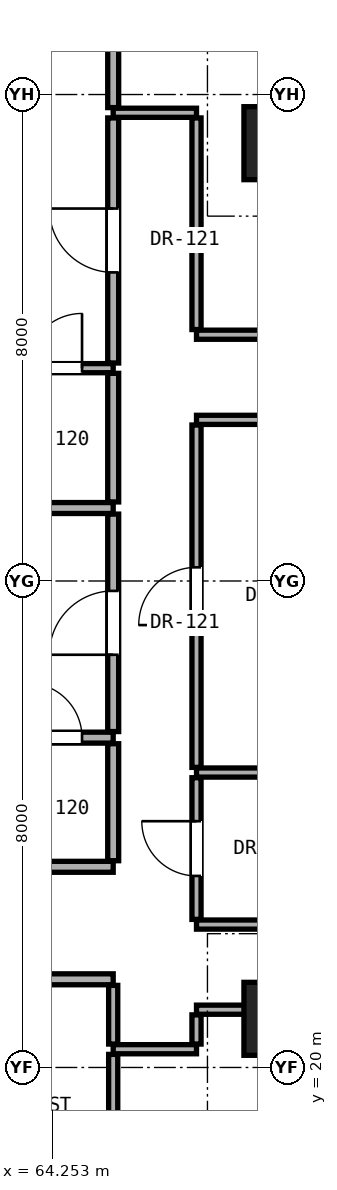
"""IFC4 building model, lengths in metres.
Left out: names, types, materials, properties, quantities, classifications, styles, units other than length and angle.
Written with IfcOpenShell. Run it as: python <this file> out.ifc"""

import sys

from ifc_helpers import new_model, si_unit, direction, frame, frame_2d, origin, origin_2d, place, context, subcontext, project, spatial, rectangle, extrude, element, fill, save


model = new_model("IFC4")
c1 = context("Model", 3, precision=1e-05, world=origin(), true_north=direction((0.0, 1.0)))
c2 = subcontext(c1, "Body", "Model", "MODEL_VIEW")
j1 = project(units=[si_unit("LENGTHUNIT", "METRE"), si_unit("PLANEANGLEUNIT", "RADIAN")], contexts=[c1])
p1 = place(None, origin())
s1 = spatial("IfcSite", under=j1, at=p1, CompositionType="ELEMENT")
p2 = place(p1, origin())
s2 = spatial("IfcBuilding", under=s1, at=p2, CompositionType="ELEMENT")
p3 = place(p2, frame((0.0, 0.0, 88.4)))
s3 = spatial("IfcBuildingStorey", under=s2, at=p3, CompositionType="ELEMENT", Elevation=88.4)
for number, where, z_axis, x_axis in (
    (1, (68.0, 20.8, 0.0), (0.0, 0.0, 1.0), (1.0, 0.0, 0.0)),
    (2, (68.0, 35.2, 0.0), (0.0, 0.0, 1.0), (1.0, 0.0, 0.0)),
):
    element("IfcColumn", number, at=place(p3, frame(where, z_axis=z_axis, x_axis=x_axis)), inside=s3, PredefinedType="COLUMN", context=c2, shape_type="SweptSolid", body=[
        extrude(rectangle(XDim=1.2, YDim=1.2, at=origin_2d()), origin(), (0.0, 0.0, 1.0), 3.3),
    ])
p4 = place(p3, frame((65.25, 20.3, 0.0), z_axis=(0.0, 0.0, 1.0), x_axis=(1.0, 0.0, 0.0)))
e3 = element("IfcWall", 3, at=p4, inside=s3, PredefinedType="PARTITIONING", context=c2, shape_type="SweptSolid", body=[
    extrude(rectangle(XDim=1.37, YDim=0.15, at=frame_2d((0.685, 0.0))), origin(), (0.0, 0.0, 1.0), 3.08),
])
p5 = place(p3, frame((66.62, 20.95, 0.0), z_axis=(0.0, 0.0, 1.0), x_axis=(1.0, 0.0, 0.0)))
e4 = element("IfcWall", 4, at=p5, inside=s3, PredefinedType="PARTITIONING", context=c2, shape_type="SweptSolid", body=[
    extrude(rectangle(XDim=1.06, YDim=0.15, at=frame_2d((0.53, 0.0))), origin(), (0.0, 0.0, 1.0), 2.472),
])
p6 = place(p3, frame((58.738, 21.45, 0.0), z_axis=(0.0, 0.0, 1.0), x_axis=(1.0, 0.0, 0.0)))
e5 = element("IfcWall", 5, at=p6, inside=s3, PredefinedType="PARTITIONING", context=c2, shape_type="SweptSolid", body=[
    extrude(rectangle(XDim=6.512, YDim=0.18, at=frame_2d((3.256, 0.0))), origin(), (0.0, 0.0, 1.0), 2.085),
])
p7 = place(p6, frame((4.117, 0.0, 0.0)))
e6 = element("IfcOpeningElement", 6, at=p7, cuts=e5, PredefinedType="OPENING", context=c2, shape_type="SweptSolid", body=[
    extrude(rectangle(XDim=0.85, YDim=2.01, at=frame_2d((0.425, 1.005))), frame((0.0, 0.1, 0.0), z_axis=(0.0, -1.0, 0.0), x_axis=(1.0, 0.0, 0.0)), (0.0, 0.0, 1.0), 0.2),
])
p8 = place(p3, frame((66.62, 22.35, 0.0), z_axis=(0.0, 0.0, 1.0), x_axis=(1.0, 0.0, 0.0)))
e7 = element("IfcWall", 7, at=p8, inside=s3, PredefinedType="PARTITIONING", context=c2, shape_type="SweptSolid", body=[
    extrude(rectangle(XDim=19.63, YDim=0.15, at=frame_2d((9.815, 0.0))), origin(), (0.0, 0.0, 1.0), 2.145),
])
p9 = place(p8, frame((12.085, 0.0, 0.0)))
e8 = element("IfcOpeningElement", 8, at=p9, cuts=e7, PredefinedType="OPENING", context=c2, shape_type="SweptSolid", body=[
    extrude(rectangle(XDim=0.85, YDim=2.01, at=frame_2d((0.425, 1.005))), frame((0.0, 0.085, 0.0), z_axis=(0.0, -1.0, 0.0), x_axis=(1.0, 0.0, 0.0)), (0.0, 0.0, 1.0), 0.17),
])
p10 = place(p3, frame((32.14, 23.3, 0.0), z_axis=(0.0, 0.0, 1.0), x_axis=(1.0, 0.0, 0.0)))
e9 = element("IfcWall", 9, at=p10, inside=s3, PredefinedType="PARTITIONING", context=c2, shape_type="SweptSolid", body=[
    extrude(rectangle(XDim=33.11, YDim=0.18, at=frame_2d((16.555, 0.0))), origin(), (0.0, 0.0, 1.0), 2.145),
])
p11 = place(p10, frame((12.335, 0.0, 0.0)))
e10 = element("IfcOpeningElement", 10, at=p11, cuts=e9, PredefinedType="OPENING", context=c2, shape_type="SweptSolid", body=[
    extrude(rectangle(XDim=0.85, YDim=2.01, at=frame_2d((0.425, 1.005))), frame((0.0, 0.1, 0.0), z_axis=(0.0, -1.0, 0.0), x_axis=(1.0, 0.0, 0.0)), (0.0, 0.0, 1.0), 0.2),
])
p12 = place(p10, frame((19.504, 0.0, 0.0)))
e11 = element("IfcOpeningElement", 11, at=p12, cuts=e9, PredefinedType="OPENING", context=c2, shape_type="SweptSolid", body=[
    extrude(rectangle(XDim=0.85, YDim=2.01, at=frame_2d((0.425, 1.005))), frame((0.0, 0.1, 0.0), z_axis=(0.0, -1.0, 0.0), x_axis=(1.0, 0.0, 0.0)), (0.0, 0.0, 1.0), 0.2),
])
p13 = place(p10, frame((24.398, 0.0, 0.0)))
e12 = element("IfcOpeningElement", 12, at=p13, cuts=e9, PredefinedType="OPENING", context=c2, shape_type="SweptSolid", body=[
    extrude(rectangle(XDim=0.9, YDim=2.1, at=frame_2d((0.45, 1.05))), frame((0.0, 0.1, 0.0), z_axis=(0.0, -1.0, 0.0), x_axis=(1.0, 0.0, 0.0)), (0.0, 0.0, 1.0), 0.2),
])
p14 = place(p3, frame((66.62, 24.85, 0.0), z_axis=(0.0, 0.0, 1.0), x_axis=(1.0, 0.0, 0.0)))
e13 = element("IfcWall", 13, at=p14, inside=s3, PredefinedType="PARTITIONING", context=c2, shape_type="SweptSolid", body=[
    extrude(rectangle(XDim=3.13, YDim=0.15, at=frame_2d((1.565, 0.0))), origin(), (0.0, 0.0, 1.0), 2.145),
])
p15 = place(p3, frame((59.358, 25.424, 0.0), z_axis=(0.0, 0.0, 1.0), x_axis=(1.0, 0.0, 0.0)))
e14 = element("IfcWall", 14, at=p15, inside=s3, PredefinedType="PARTITIONING", context=c2, shape_type="SweptSolid", body=[
    extrude(rectangle(XDim=5.892, YDim=0.18, at=frame_2d((2.946, 0.0))), origin(), (0.0, 0.0, 1.0), 2.216),
])
p16 = place(p15, frame((1.549, 0.0, 0.0)))
e15 = element("IfcOpeningElement", 15, at=p16, cuts=e14, PredefinedType="OPENING", context=c2, shape_type="SweptSolid", body=[
    extrude(rectangle(XDim=0.95, YDim=2.15, at=frame_2d((0.475, 1.075))), frame((0.0, 0.1, 0.0), z_axis=(0.0, -1.0, 0.0), x_axis=(1.0, 0.0, 0.0)), (0.0, 0.0, 1.0), 0.2),
])
p17 = place(p15, frame((4.479, 0.0, 0.0)))
e16 = element("IfcOpeningElement", 16, at=p17, cuts=e14, PredefinedType="OPENING", context=c2, shape_type="SweptSolid", body=[
    extrude(rectangle(XDim=0.9, YDim=2.1, at=frame_2d((0.45, 1.05))), frame((0.0, 0.1, 0.0), z_axis=(0.0, -1.0, 0.0), x_axis=(1.0, 0.0, 0.0)), (0.0, 0.0, 1.0), 0.2),
])
p18 = place(p3, frame((59.358, 29.2, 0.0), z_axis=(0.0, 0.0, 1.0), x_axis=(1.0, 0.0, 0.0)))
e17 = element("IfcWall", 17, at=p18, inside=s3, PredefinedType="PARTITIONING", context=c2, shape_type="SweptSolid", body=[
    extrude(rectangle(XDim=5.892, YDim=0.18, at=frame_2d((2.946, 0.0))), origin(), (0.0, 0.0, 1.0), 2.216),
])
p19 = place(p3, frame((66.62, 30.65, 0.0), z_axis=(0.0, 0.0, 1.0), x_axis=(1.0, 0.0, 0.0)))
e18 = element("IfcWall", 18, at=p19, inside=s3, PredefinedType="PARTITIONING", context=c2, shape_type="SweptSolid", body=[
    extrude(rectangle(XDim=19.63, YDim=0.15, at=frame_2d((9.815, 0.0))), origin(), (0.0, 0.0, 1.0), 2.145),
])
p20 = place(p19, frame((3.855, 0.0, 0.0)))
e19 = element("IfcOpeningElement", 19, at=p20, cuts=e18, PredefinedType="OPENING", context=c2, shape_type="SweptSolid", body=[
    extrude(rectangle(XDim=0.85, YDim=2.01, at=frame_2d((0.425, 1.005))), frame((0.0, 0.085, 0.0), z_axis=(0.0, -1.0, 0.0), x_axis=(1.0, 0.0, 0.0)), (0.0, 0.0, 1.0), 0.17),
])
p21 = place(p19, frame((12.085, 0.0, 0.0)))
e20 = element("IfcOpeningElement", 20, at=p21, cuts=e18, PredefinedType="OPENING", context=c2, shape_type="SweptSolid", body=[
    extrude(rectangle(XDim=0.85, YDim=2.01, at=frame_2d((0.425, 1.005))), frame((0.0, 0.085, 0.0), z_axis=(0.0, -1.0, 0.0), x_axis=(1.0, 0.0, 0.0)), (0.0, 0.0, 1.0), 0.17),
])
p22 = place(p3, frame((59.358, 31.5, 0.0), z_axis=(0.0, 0.0, 1.0), x_axis=(1.0, 0.0, 0.0)))
e21 = element("IfcWall", 21, at=p22, inside=s3, PredefinedType="PARTITIONING", context=c2, shape_type="SweptSolid", body=[
    extrude(rectangle(XDim=5.892, YDim=0.15, at=frame_2d((2.946, 0.0))), origin(), (0.0, 0.0, 1.0), 2.216),
])
p23 = place(p22, frame((1.549, 0.0, 0.0)))
e22 = element("IfcOpeningElement", 22, at=p23, cuts=e21, PredefinedType="OPENING", context=c2, shape_type="SweptSolid", body=[
    extrude(rectangle(XDim=0.95, YDim=2.15, at=frame_2d((0.475, 1.075))), frame((0.0, 0.085, 0.0), z_axis=(0.0, -1.0, 0.0), x_axis=(1.0, 0.0, 0.0)), (0.0, 0.0, 1.0), 0.17),
])
p24 = place(p22, frame((4.479, 0.0, 0.0)))
e23 = element("IfcOpeningElement", 23, at=p24, cuts=e21, PredefinedType="OPENING", context=c2, shape_type="SweptSolid", body=[
    extrude(rectangle(XDim=0.9, YDim=2.1, at=frame_2d((0.45, 1.05))), frame((0.0, 0.085, 0.0), z_axis=(0.0, -1.0, 0.0), x_axis=(1.0, 0.0, 0.0)), (0.0, 0.0, 1.0), 0.17),
])
p25 = place(p3, frame((66.62, 32.05, 0.0), z_axis=(0.0, 0.0, 1.0), x_axis=(1.0, 0.0, 0.0)))
e24 = element("IfcWall", 24, at=p25, inside=s3, PredefinedType="PARTITIONING", context=c2, shape_type="SweptSolid", body=[
    extrude(rectangle(XDim=2.18, YDim=0.15, at=frame_2d((1.09, 0.0))), origin(), (0.0, 0.0, 1.0), 2.145),
])
p26 = place(p3, frame((65.25, 35.7, 0.0), z_axis=(0.0, 0.0, 1.0), x_axis=(1.0, 0.0, 0.0)))
e25 = element("IfcWall", 25, at=p26, inside=s3, PredefinedType="PARTITIONING", context=c2, shape_type="SweptSolid", body=[
    extrude(rectangle(XDim=1.37, YDim=0.15, at=frame_2d((0.685, 0.0))), origin(), (0.0, 0.0, 1.0), 3.08),
])
p27 = place(p3, frame((65.25, 17.004, 0.0), z_axis=(0.0, 0.0, 1.0), x_axis=(0.0, 1.0, 0.0)))
e26 = element("IfcWall", 26, at=p27, inside=s3, PredefinedType="PARTITIONING", context=c2, shape_type="SweptSolid", body=[
    extrude(rectangle(XDim=3.211, YDim=0.15, at=frame_2d((1.605, 0.0))), origin(), (0.0, 0.0, 1.0), 2.456),
])
p28 = place(p3, frame((65.25, 20.385, 0.0), z_axis=(0.0, 0.0, 1.0), x_axis=(0.0, 1.0, 0.0)))
e27 = element("IfcWall", 27, at=p28, inside=s3, PredefinedType="PARTITIONING", context=c2, shape_type="SweptSolid", body=[
    extrude(rectangle(XDim=0.965, YDim=0.15, at=frame_2d((0.482, 0.0))), origin(), (0.0, 0.0, 1.0), 2.472),
])
p29 = place(p3, frame((65.25, 23.4, 0.0), z_axis=(0.0, 0.0, 1.0), x_axis=(0.0, 1.0, 0.0)))
e28 = element("IfcWall", 28, at=p29, inside=s3, PredefinedType="PARTITIONING", context=c2, shape_type="SweptSolid", body=[
    extrude(rectangle(XDim=1.924, YDim=0.18, at=frame_2d((0.962, 0.0))), origin(), (0.0, 0.0, 1.0), 3.08),
])
p30 = place(p3, frame((65.25, 25.524, 0.0), z_axis=(0.0, 0.0, 1.0), x_axis=(0.0, 1.0, 0.0)))
e29 = element("IfcWall", 29, at=p30, inside=s3, PredefinedType="PARTITIONING", context=c2, shape_type="SweptSolid", body=[
    extrude(rectangle(XDim=3.576, YDim=0.18, at=frame_2d((1.788, 0.0))), origin(), (0.0, 0.0, 1.0), 2.299),
])
p31 = place(p30, frame((1.263, 0.0, 0.0)))
e30 = element("IfcOpeningElement", 30, at=p31, cuts=e29, PredefinedType="OPENING", context=c2, shape_type="SweptSolid", body=[
    extrude(rectangle(XDim=1.05, YDim=2.2, at=frame_2d((0.525, 1.1))), frame((0.0, 0.1, 0.0), z_axis=(0.0, -1.0, 0.0), x_axis=(1.0, 0.0, 0.0)), (0.0, 0.0, 1.0), 0.2),
])
p32 = place(p3, frame((65.25, 29.3, 0.0), z_axis=(0.0, 0.0, 1.0), x_axis=(0.0, 1.0, 0.0)))
e31 = element("IfcWall", 31, at=p32, inside=s3, PredefinedType="PARTITIONING", context=c2, shape_type="SweptSolid", body=[
    extrude(rectangle(XDim=2.115, YDim=0.18, at=frame_2d((1.058, 0.0))), origin(), (0.0, 0.0, 1.0), 3.08),
])
p33 = place(p3, frame((65.25, 31.585, 0.0), z_axis=(0.0, 0.0, 1.0), x_axis=(0.0, 1.0, 0.0)))
e32 = element("IfcWall", 32, at=p33, inside=s3, PredefinedType="PARTITIONING", context=c2, shape_type="SweptSolid", body=[
    extrude(rectangle(XDim=4.03, YDim=0.18, at=frame_2d((2.015, 0.0))), origin(), (0.0, 0.0, 1.0), 2.472),
])
p34 = place(p33, frame((1.49, 0.0, 0.0)))
e33 = element("IfcOpeningElement", 33, at=p34, cuts=e32, PredefinedType="OPENING", context=c2, shape_type="SweptSolid", body=[
    extrude(rectangle(XDim=1.05, YDim=2.2, at=frame_2d((0.525, 1.1))), frame((0.0, 0.1, 0.0), z_axis=(0.0, -1.0, 0.0), x_axis=(1.0, 0.0, 0.0)), (0.0, 0.0, 1.0), 0.2),
])
p35 = place(p3, frame((65.25, 35.785, 0.0), z_axis=(0.0, 0.0, 1.0), x_axis=(0.0, 1.0, 0.0)))
e34 = element("IfcWall", 34, at=p35, inside=s3, PredefinedType="PARTITIONING", context=c2, shape_type="SweptSolid", body=[
    extrude(rectangle(XDim=3.211, YDim=0.18, at=frame_2d((1.605, 0.0))), origin(), (0.0, 0.0, 1.0), 2.456),
])
p36 = place(p3, frame((66.62, 20.385, 0.0), z_axis=(0.0, 0.0, 1.0), x_axis=(0.0, 1.0, 0.0)))
e35 = element("IfcWall", 35, at=p36, inside=s3, PredefinedType="PARTITIONING", context=c2, shape_type="SweptSolid", body=[
    extrude(rectangle(XDim=0.48, YDim=0.15, at=frame_2d((0.24, 0.0))), origin(), (0.0, 0.0, 1.0), 2.472),
])
p37 = place(p3, frame((66.62, 22.435, 0.0), z_axis=(0.0, 0.0, 1.0), x_axis=(0.0, 1.0, 0.0)))
e36 = element("IfcWall", 36, at=p37, inside=s3, PredefinedType="PARTITIONING", context=c2, shape_type="SweptSolid", body=[
    extrude(rectangle(XDim=2.33, YDim=0.15, at=frame_2d((1.165, 0.0))), origin(), (0.0, 0.0, 1.0), 3.08),
])
p38 = place(p37, frame((0.715, 0.0, 0.0)))
e37 = element("IfcOpeningElement", 37, at=p38, cuts=e36, PredefinedType="OPENING", context=c2, shape_type="SweptSolid", body=[
    extrude(rectangle(XDim=0.9, YDim=2.1, at=frame_2d((0.45, 1.05))), frame((0.0, 0.085, 0.0), z_axis=(0.0, -1.0, 0.0), x_axis=(1.0, 0.0, 0.0)), (0.0, 0.0, 1.0), 0.17),
])
p39 = place(p3, frame((66.62, 24.935, 0.0), z_axis=(0.0, 0.0, 1.0), x_axis=(0.0, 1.0, 0.0)))
e38 = element("IfcWall", 38, at=p39, inside=s3, PredefinedType="PARTITIONING", context=c2, shape_type="SweptSolid", body=[
    extrude(rectangle(XDim=5.63, YDim=0.15, at=frame_2d((2.815, 0.0))), origin(), (0.0, 0.0, 1.0), 2.299),
])
p40 = place(p39, frame((2.34, 0.0, 0.0)))
e39 = element("IfcOpeningElement", 39, at=p40, cuts=e38, PredefinedType="OPENING", context=c2, shape_type="SweptSolid", body=[
    extrude(rectangle(XDim=0.95, YDim=2.15, at=frame_2d((0.475, 1.075))), frame((0.0, 0.085, 0.0), z_axis=(0.0, -1.0, 0.0), x_axis=(1.0, 0.0, 0.0)), (0.0, 0.0, 1.0), 0.17),
])
p41 = place(p3, frame((66.62, 32.135, 0.0), z_axis=(0.0, 0.0, 1.0), x_axis=(0.0, 1.0, 0.0)))
e40 = element("IfcWall", 40, at=p41, inside=s3, PredefinedType="PARTITIONING", context=c2, shape_type="SweptSolid", body=[
    extrude(rectangle(XDim=3.48, YDim=0.15, at=frame_2d((1.74, 0.0))), origin(), (0.0, 0.0, 1.0), 2.472),
])
p42 = place(p38, origin())
e41 = element("IfcDoor", 41, at=p42, inside=s3, OperationType="SINGLE_SWING_RIGHT", PredefinedType="DOOR", context=c2, shape_type="SweptSolid", body=[
    extrude(rectangle(XDim=0.9, YDim=2.1, at=frame_2d((0.45, 1.05))), frame((0.0, 0.025, 0.0), z_axis=(0.0, -1.0, 0.0), x_axis=(1.0, 0.0, 0.0)), (0.0, 0.0, 1.0), 0.05),
])
fill(e37, e41)
p43 = place(p31, origin())
e42 = element("IfcDoor", 42, at=p43, inside=s3, OperationType="SINGLE_SWING_LEFT", PredefinedType="DOOR", context=c2, shape_type="SweptSolid", body=[
    extrude(rectangle(XDim=1.05, YDim=2.2, at=frame_2d((0.525, 1.1))), frame((0.0, 0.025, 0.0), z_axis=(0.0, -1.0, 0.0), x_axis=(1.0, 0.0, 0.0)), (0.0, 0.0, 1.0), 0.05),
])
fill(e30, e42)
p44 = place(p17, origin())
e43 = element("IfcDoor", 43, at=p44, inside=s3, OperationType="SINGLE_SWING_LEFT", PredefinedType="DOOR", context=c2, shape_type="SweptSolid", body=[
    extrude(rectangle(XDim=0.9, YDim=2.1, at=frame_2d((0.45, 1.05))), frame((0.0, 0.025, 0.0), z_axis=(0.0, -1.0, 0.0), x_axis=(1.0, 0.0, 0.0)), (0.0, 0.0, 1.0), 0.05),
])
fill(e16, e43)
p45 = place(p34, origin())
e44 = element("IfcDoor", 44, at=p45, inside=s3, OperationType="SINGLE_SWING_RIGHT", PredefinedType="DOOR", context=c2, shape_type="SweptSolid", body=[
    extrude(rectangle(XDim=1.05, YDim=2.2, at=frame_2d((0.525, 1.1))), frame((0.0, 0.025, 0.0), z_axis=(0.0, -1.0, 0.0), x_axis=(1.0, 0.0, 0.0)), (0.0, 0.0, 1.0), 0.05),
])
fill(e33, e44)
p46 = place(p24, origin())
e45 = element("IfcDoor", 45, at=p46, inside=s3, OperationType="SINGLE_SWING_RIGHT", PredefinedType="DOOR", context=c2, shape_type="SweptSolid", body=[
    extrude(rectangle(XDim=0.9, YDim=2.1, at=frame_2d((0.45, 1.05))), frame((0.0, 0.025, 0.0), z_axis=(0.0, -1.0, 0.0), x_axis=(1.0, 0.0, 0.0)), (0.0, 0.0, 1.0), 0.05),
])
fill(e23, e45)
p47 = place(p40, origin())
e46 = element("IfcDoor", 46, at=p47, inside=s3, OperationType="SINGLE_SWING_LEFT", PredefinedType="DOOR", context=c2, shape_type="SweptSolid", body=[
    extrude(rectangle(XDim=0.95, YDim=2.15, at=frame_2d((0.475, 1.075))), frame((0.0, 0.025, 0.0), z_axis=(0.0, -1.0, 0.0), x_axis=(1.0, 0.0, 0.0)), (0.0, 0.0, 1.0), 0.05),
])
fill(e39, e46)
save(model, sys.argv[1])
